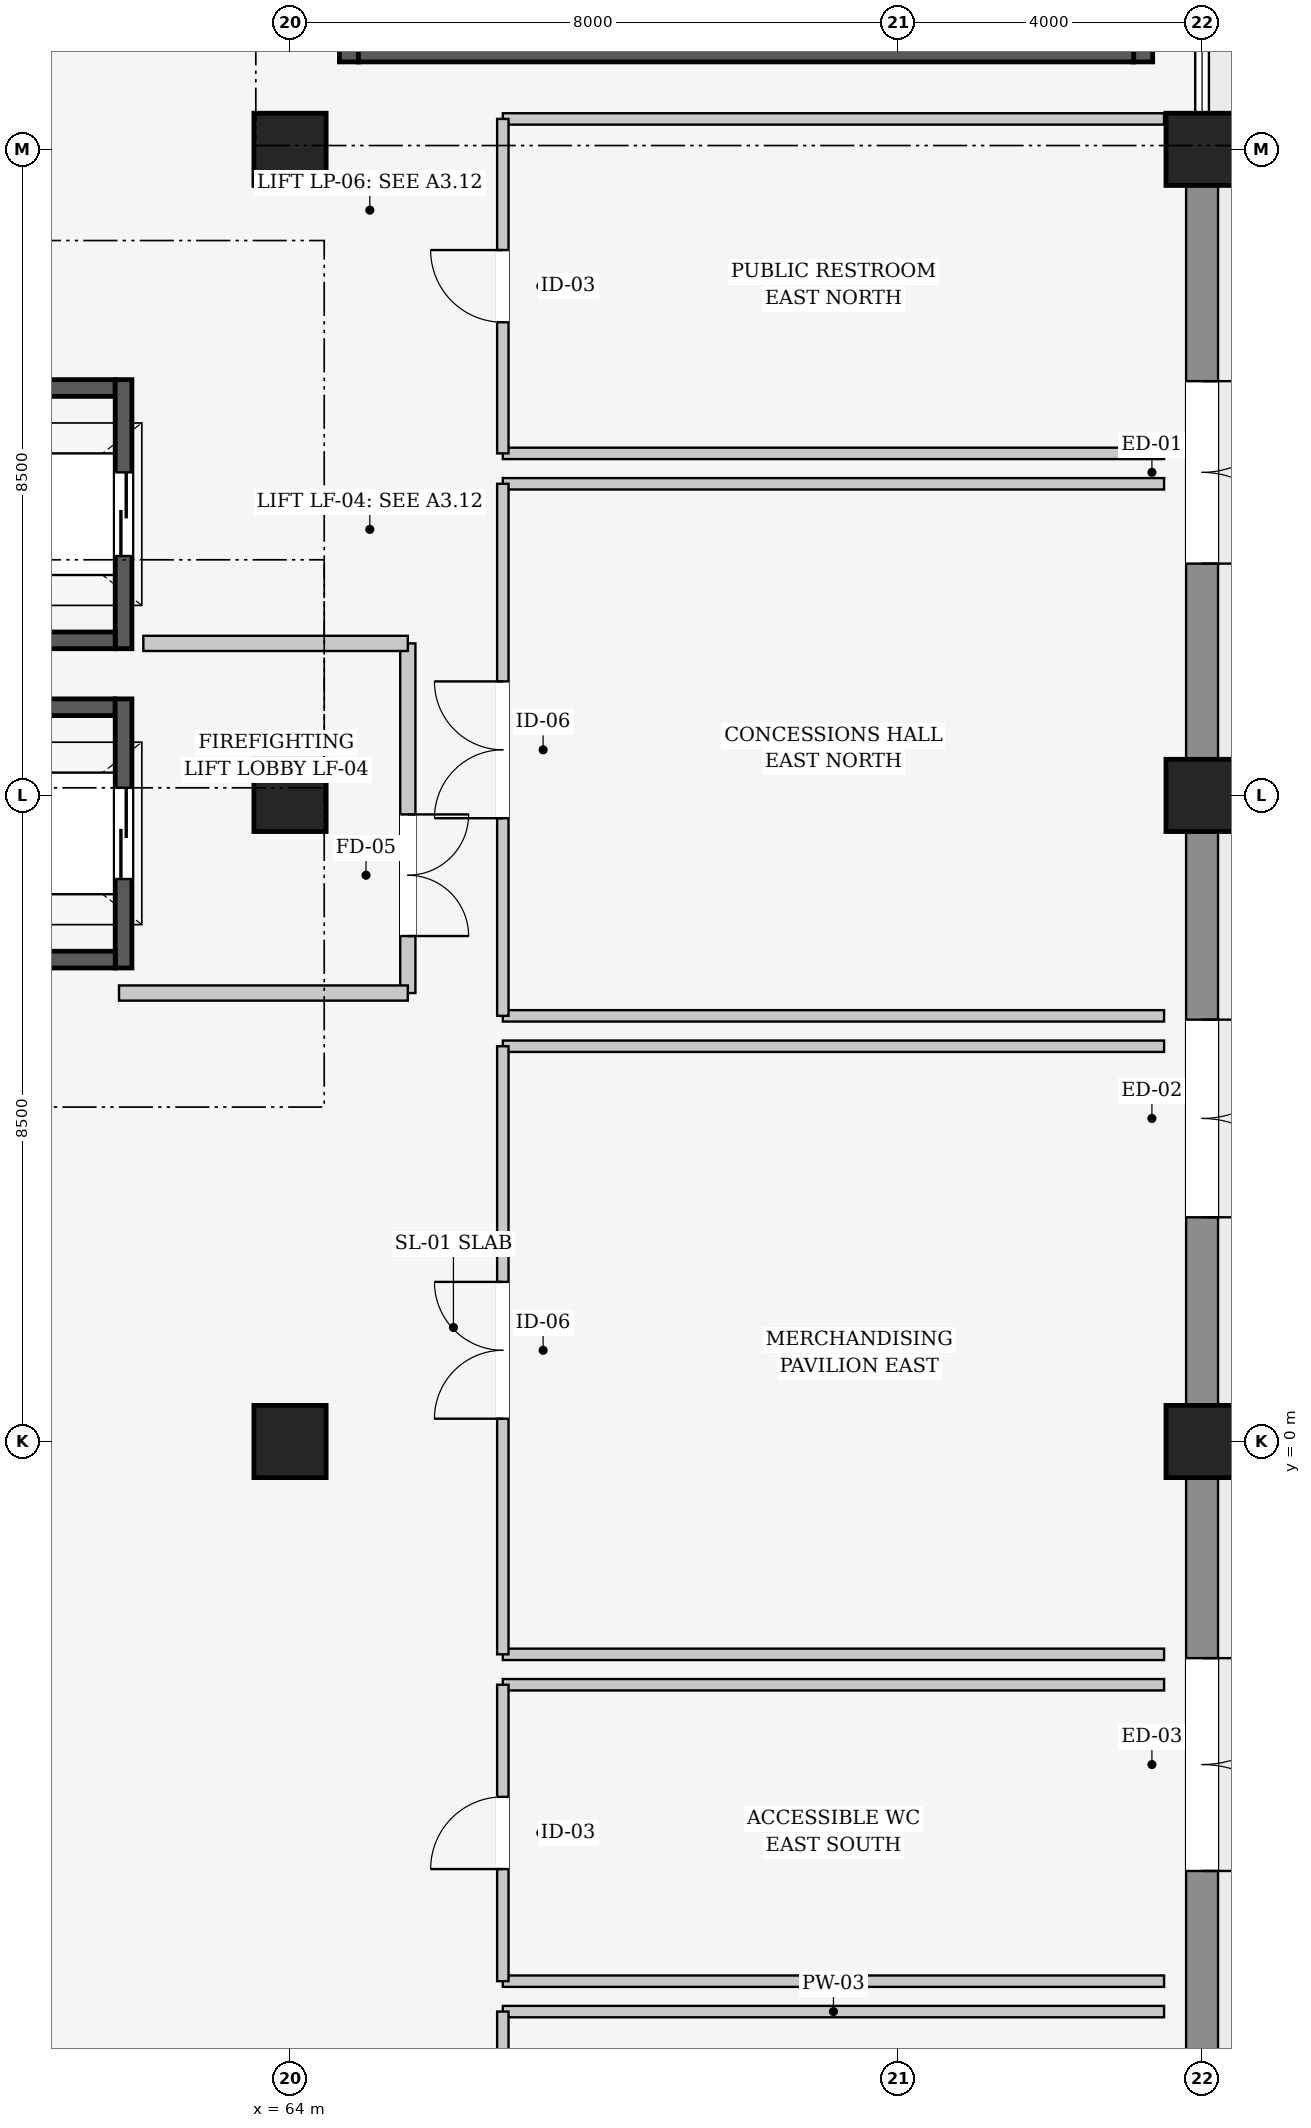
"""IFC4 building model, lengths in metres.
Left out: names, types, materials, properties, quantities, classifications, styles, units other than length and angle.
Written with IfcOpenShell. Run it as: python <this file> out.ifc"""

import sys

from ifc_helpers import new_model, si_unit, direction, frame, frame_2d, origin, origin_2d, place, context, subcontext, project, spatial, rectangle, extrude, element, fill, save


model = new_model("IFC4")
c1 = context("Model", 3, precision=1e-05, world=origin(), true_north=direction((0.0, 1.0)))
c2 = subcontext(c1, "Body", "Model", "MODEL_VIEW")
j1 = project(units=[si_unit("LENGTHUNIT", "METRE"), si_unit("PLANEANGLEUNIT", "RADIAN")], contexts=[c1])
p1 = place(None, origin())
s1 = spatial("IfcSite", under=j1, at=p1, CompositionType="ELEMENT")
p2 = place(p1, origin())
s2 = spatial("IfcBuilding", under=s1, at=p2, CompositionType="ELEMENT")
p3 = place(p2, origin())
s3 = spatial("IfcBuildingStorey", under=s2, at=p3, CompositionType="ELEMENT", Elevation=0.0)
for number, where, z_axis, x_axis in (
    (1, (64.0, 0.0, 0.0), (0.0, 0.0, 1.0), (1.0, 0.0, 0.0)),
    (2, (64.0, 8.5, 0.0), (0.0, 0.0, 1.0), (1.0, 0.0, 0.0)),
    (3, (64.0, 17.0, 0.0), (0.0, 0.0, 1.0), (1.0, 0.0, 0.0)),
    (4, (76.0, 0.0, 0.0), (0.0, 0.0, 1.0), (1.0, 0.0, 0.0)),
    (5, (76.0, 8.5, 0.0), (0.0, 0.0, 1.0), (1.0, 0.0, 0.0)),
    (6, (76.0, 17.0, 0.0), (0.0, 0.0, 1.0), (1.0, 0.0, 0.0)),
):
    element("IfcColumn", number, at=place(p3, frame(where, z_axis=z_axis, x_axis=x_axis)), inside=s3, PredefinedType="COLUMN", context=c2, shape_type="SweptSolid", body=[
        extrude(rectangle(XDim=0.95, YDim=0.95, at=origin_2d()), origin(), (0.0, 0.0, 1.0), 6.0),
    ])
p4 = place(p3, frame((76.0, -0.457, 0.0), z_axis=(0.0, 0.0, 1.0), x_axis=(0.0, -1.0, 0.0)))
e7 = element("IfcWall", 7, at=p4, inside=s3, PredefinedType="SOLIDWALL", context=c2, shape_type="SweptSolid", body=[
    extrude(rectangle(XDim=7.586, YDim=0.42, at=frame_2d((3.793, 0.0))), origin(), (0.0, 0.0, 1.0), 4.74),
])
p5 = place(p4, frame((2.393, 0.0, 0.0)))
e8 = element("IfcOpeningElement", 8, at=p5, cuts=e7, PredefinedType="OPENING", context=c2, shape_type="SweptSolid", body=[
    extrude(rectangle(XDim=2.8, YDim=3.2, at=frame_2d((1.4, 1.6))), frame((0.0, 0.22, 0.0), z_axis=(0.0, -1.0, 0.0), x_axis=(1.0, 0.0, 0.0)), (0.0, 0.0, 1.0), 0.44),
])
p6 = place(p3, frame((76.0, 8.043, 0.0), z_axis=(0.0, 0.0, 1.0), x_axis=(0.0, -1.0, 0.0)))
e9 = element("IfcWall", 9, at=p6, inside=s3, PredefinedType="SOLIDWALL", context=c2, shape_type="SweptSolid", body=[
    extrude(rectangle(XDim=7.586, YDim=0.42, at=frame_2d((3.793, 0.0))), origin(), (0.0, 0.0, 1.0), 4.74),
])
p7 = place(p6, frame((2.493, 0.0, 0.0)))
e10 = element("IfcOpeningElement", 10, at=p7, cuts=e9, PredefinedType="OPENING", context=c2, shape_type="SweptSolid", body=[
    extrude(rectangle(XDim=2.6, YDim=3.0, at=frame_2d((1.3, 1.5))), frame((0.0, 0.22, 0.0), z_axis=(0.0, -1.0, 0.0), x_axis=(1.0, 0.0, 0.0)), (0.0, 0.0, 1.0), 0.44),
])
p8 = place(p3, frame((76.0, 16.543, 0.0), z_axis=(0.0, 0.0, 1.0), x_axis=(0.0, -1.0, 0.0)))
e11 = element("IfcWall", 11, at=p8, inside=s3, PredefinedType="SOLIDWALL", context=c2, shape_type="SweptSolid", body=[
    extrude(rectangle(XDim=7.586, YDim=0.42, at=frame_2d((3.793, 0.0))), origin(), (0.0, 0.0, 1.0), 4.74),
])
p9 = place(p8, frame((2.593, 0.0, 0.0)))
e12 = element("IfcOpeningElement", 12, at=p9, cuts=e11, PredefinedType="OPENING", context=c2, shape_type="SweptSolid", body=[
    extrude(rectangle(XDim=2.4, YDim=3.0, at=frame_2d((1.2, 1.5))), frame((0.0, 0.22, 0.0), z_axis=(0.0, -1.0, 0.0), x_axis=(1.0, 0.0, 0.0)), (0.0, 0.0, 1.0), 0.44),
])
p10 = place(p3, frame((64.775, 18.15, 0.0), z_axis=(0.0, 0.0, 1.0), x_axis=(0.0, 1.0, 0.0)))
e13 = element("IfcWall", 13, at=p10, inside=s3, PredefinedType="SHEAR", context=c2, shape_type="SweptSolid", body=[
    extrude(rectangle(XDim=5.7, YDim=0.25, at=frame_2d((2.85, 0.0))), origin(), (0.0, 0.0, 1.0), 6.0),
])
p11 = place(p10, frame((2.025, 0.0, 0.0)))
e14 = element("IfcOpeningElement", 14, at=p11, cuts=e13, PredefinedType="OPENING", context=c2, shape_type="SweptSolid", body=[
    extrude(rectangle(XDim=1.65, YDim=2.2, at=frame_2d((0.825, 1.1))), frame((0.0, 0.135, 0.0), z_axis=(0.0, -1.0, 0.0), x_axis=(1.0, 0.0, 0.0)), (0.0, 0.0, 1.0), 0.27),
])
p12 = place(p3, frame((75.225, 23.85, 0.0), z_axis=(0.0, 0.0, 1.0), x_axis=(0.0, -1.0, 0.0)))
e15 = element("IfcWall", 15, at=p12, inside=s3, PredefinedType="SHEAR", context=c2, shape_type="SweptSolid", body=[
    extrude(rectangle(XDim=5.7, YDim=0.25, at=frame_2d((2.85, 0.0))), origin(), (0.0, 0.0, 1.0), 6.0),
])
p13 = place(p3, frame((75.1, 18.275, 0.0), z_axis=(0.0, 0.0, 1.0), x_axis=(-1.0, 0.0, 0.0)))
e16 = element("IfcWall", 16, at=p13, inside=s3, PredefinedType="SHEAR", context=c2, shape_type="SweptSolid", body=[
    extrude(rectangle(XDim=10.2, YDim=0.25, at=frame_2d((5.1, 0.0))), origin(), (0.0, 0.0, 1.0), 6.0),
])
p14 = place(p3, frame((59.3, 9.66, 0.0), z_axis=(0.0, 0.0, 1.0), x_axis=(1.0, 0.0, 0.0)))
e17 = element("IfcWall", 17, at=p14, inside=s3, PredefinedType="SHEAR", context=c2, shape_type="SweptSolid", body=[
    extrude(rectangle(XDim=2.4, YDim=0.22, at=frame_2d((1.2, 0.0))), origin(), (0.0, 0.0, 1.0), 6.0),
])
p15 = place(p3, frame((61.81, 9.77, 0.0), z_axis=(0.0, 0.0, 1.0), x_axis=(0.0, -1.0, 0.0)))
e18 = element("IfcWall", 18, at=p15, inside=s3, PredefinedType="SHEAR", context=c2, shape_type="SweptSolid", body=[
    extrude(rectangle(XDim=3.54, YDim=0.22, at=frame_2d((1.77, 0.0))), origin(), (0.0, 0.0, 1.0), 6.0),
])
p16 = place(p15, frame((1.17, 0.0, 0.0)))
e19 = element("IfcOpeningElement", 19, at=p16, cuts=e18, PredefinedType="OPENING", context=c2, shape_type="SweptSolid", body=[
    extrude(rectangle(XDim=1.2, YDim=2.2, at=frame_2d((0.6, 1.1))), frame((0.0, 0.12, 0.0), z_axis=(0.0, -1.0, 0.0), x_axis=(1.0, 0.0, 0.0)), (0.0, 0.0, 1.0), 0.24),
])
for number, where, z_axis, x_axis in (
    (20, (61.7, 6.34, 0.0), (0.0, 0.0, 1.0), (-1.0, 0.0, 0.0)),
    (21, (59.3, 13.86, 0.0), (0.0, 0.0, 1.0), (1.0, 0.0, 0.0)),
):
    element("IfcWall", number, at=place(p3, frame(where, z_axis=z_axis, x_axis=x_axis)), inside=s3, PredefinedType="SHEAR", context=c2, shape_type="SweptSolid", body=[
        extrude(rectangle(XDim=2.4, YDim=0.22, at=frame_2d((1.2, 0.0))), origin(), (0.0, 0.0, 1.0), 6.0),
    ])
p17 = place(p3, frame((61.81, 13.97, 0.0), z_axis=(0.0, 0.0, 1.0), x_axis=(0.0, -1.0, 0.0)))
e22 = element("IfcWall", 22, at=p17, inside=s3, PredefinedType="SHEAR", context=c2, shape_type="SweptSolid", body=[
    extrude(rectangle(XDim=3.54, YDim=0.22, at=frame_2d((1.77, 0.0))), origin(), (0.0, 0.0, 1.0), 6.0),
])
p18 = place(p17, frame((1.22, 0.0, 0.0)))
e23 = element("IfcOpeningElement", 23, at=p18, cuts=e22, PredefinedType="OPENING", context=c2, shape_type="SweptSolid", body=[
    extrude(rectangle(XDim=1.1, YDim=2.2, at=frame_2d((0.55, 1.1))), frame((0.0, 0.12, 0.0), z_axis=(0.0, -1.0, 0.0), x_axis=(1.0, 0.0, 0.0)), (0.0, 0.0, 1.0), 0.24),
])
p19 = place(p3, frame((61.7, 10.54, 0.0), z_axis=(0.0, 0.0, 1.0), x_axis=(-1.0, 0.0, 0.0)))
e24 = element("IfcWall", 24, at=p19, inside=s3, PredefinedType="SHEAR", context=c2, shape_type="SweptSolid", body=[
    extrude(rectangle(XDim=2.4, YDim=0.22, at=frame_2d((1.2, 0.0))), origin(), (0.0, 0.0, 1.0), 6.0),
])
p20 = place(p3, frame((65.55, 10.5, 0.0), z_axis=(0.0, 0.0, 1.0), x_axis=(0.0, -1.0, 0.0)))
e25 = element("IfcWall", 25, at=p20, inside=s3, PredefinedType="PARTITIONING", context=c2, shape_type="SweptSolid", body=[
    extrude(rectangle(XDim=4.6, YDim=0.2, at=frame_2d((2.3, 0.0))), origin(), (0.0, 0.0, 1.0), 4.725),
])
p21 = place(p20, frame((2.25, 0.0, 0.0)))
e26 = element("IfcOpeningElement", 26, at=p21, cuts=e25, PredefinedType="OPENING", context=c2, shape_type="SweptSolid", body=[
    extrude(rectangle(XDim=1.6, YDim=2.2, at=frame_2d((0.8, 1.1))), frame((0.0, 0.11, 0.0), z_axis=(0.0, -1.0, 0.0), x_axis=(1.0, 0.0, 0.0)), (0.0, 0.0, 1.0), 0.22),
])
p22 = place(p3, frame((62.07, 10.5, 0.0), z_axis=(0.0, 0.0, 1.0), x_axis=(1.0, 0.0, 0.0)))
e27 = element("IfcWall", 27, at=p22, inside=s3, PredefinedType="PARTITIONING", context=c2, shape_type="SweptSolid", body=[
    extrude(rectangle(XDim=3.48, YDim=0.2, at=frame_2d((1.74, 0.0))), origin(), (0.0, 0.0, 1.0), 5.025),
])
p23 = place(p3, frame((65.55, 5.9, 0.0), z_axis=(0.0, 0.0, 1.0), x_axis=(-1.0, 0.0, 0.0)))
e28 = element("IfcWall", 28, at=p23, inside=s3, PredefinedType="PARTITIONING", context=c2, shape_type="SweptSolid", body=[
    extrude(rectangle(XDim=3.8, YDim=0.2, at=frame_2d((1.9, 0.0))), origin(), (0.0, 0.0, 1.0), 5.025),
])
p24 = place(p3, frame((66.8, -7.5, 0.0), z_axis=(0.0, 0.0, 1.0), x_axis=(1.0, 0.0, 0.0)))
e29 = element("IfcWall", 29, at=p24, inside=s3, PredefinedType="PARTITIONING", context=c2, shape_type="SweptSolid", body=[
    extrude(rectangle(XDim=8.7, YDim=0.15, at=frame_2d((4.35, 0.0))), origin(), (0.0, 0.0, 1.0), 5.64),
])
p25 = place(p3, frame((66.8, -14.6, 0.0), z_axis=(0.0, 0.0, 1.0), x_axis=(0.0, 1.0, 0.0)))
e30 = element("IfcWall", 30, at=p25, inside=s3, PredefinedType="PARTITIONING", context=c2, shape_type="SweptSolid", body=[
    extrude(rectangle(XDim=7.1, YDim=0.15, at=frame_2d((3.55, 0.0))), origin(), (0.0, 0.0, 1.0), 4.725),
])
p26 = place(p25, frame((3.075, 0.0, 0.0)))
e31 = element("IfcOpeningElement", 31, at=p26, cuts=e30, PredefinedType="OPENING", context=c2, shape_type="SweptSolid", body=[
    extrude(rectangle(XDim=0.95, YDim=2.15, at=frame_2d((0.475, 1.075))), frame((0.0, 0.085, 0.0), z_axis=(0.0, -1.0, 0.0), x_axis=(1.0, 0.0, 0.0)), (0.0, 0.0, 1.0), 0.17),
])
for number, where, z_axis, x_axis in (
    (32, (66.8, -3.2, 0.0), (0.0, 0.0, 1.0), (1.0, 0.0, 0.0)),
    (33, (75.5, -7.1, 0.0), (0.0, 0.0, 1.0), (-1.0, 0.0, 0.0)),
):
    element("IfcWall", number, at=place(p3, frame(where, z_axis=z_axis, x_axis=x_axis)), inside=s3, PredefinedType="PARTITIONING", context=c2, shape_type="SweptSolid", body=[
        extrude(rectangle(XDim=8.7, YDim=0.15, at=frame_2d((4.35, 0.0))), origin(), (0.0, 0.0, 1.0), 5.64),
    ])
p27 = place(p3, frame((66.8, -7.1, 0.0), z_axis=(0.0, 0.0, 1.0), x_axis=(0.0, 1.0, 0.0)))
e34 = element("IfcWall", 34, at=p27, inside=s3, PredefinedType="PARTITIONING", context=c2, shape_type="SweptSolid", body=[
    extrude(rectangle(XDim=3.9, YDim=0.15, at=frame_2d((1.95, 0.0))), origin(), (0.0, 0.0, 1.0), 5.32),
])
p28 = place(p27, frame((1.475, 0.0, 0.0)))
e35 = element("IfcOpeningElement", 35, at=p28, cuts=e34, PredefinedType="OPENING", context=c2, shape_type="SweptSolid", body=[
    extrude(rectangle(XDim=0.95, YDim=2.15, at=frame_2d((0.475, 1.075))), frame((0.0, 0.085, 0.0), z_axis=(0.0, -1.0, 0.0), x_axis=(1.0, 0.0, 0.0)), (0.0, 0.0, 1.0), 0.17),
])
for number, where, z_axis, x_axis in (
    (36, (66.8, 5.2, 0.0), (0.0, 0.0, 1.0), (1.0, 0.0, 0.0)),
    (37, (75.5, -2.8, 0.0), (0.0, 0.0, 1.0), (-1.0, 0.0, 0.0)),
):
    element("IfcWall", number, at=place(p3, frame(where, z_axis=z_axis, x_axis=x_axis)), inside=s3, PredefinedType="PARTITIONING", context=c2, shape_type="SweptSolid", body=[
        extrude(rectangle(XDim=8.7, YDim=0.15, at=frame_2d((4.35, 0.0))), origin(), (0.0, 0.0, 1.0), 5.64),
    ])
p29 = place(p3, frame((66.8, -2.8, 0.0), z_axis=(0.0, 0.0, 1.0), x_axis=(0.0, 1.0, 0.0)))
e38 = element("IfcWall", 38, at=p29, inside=s3, PredefinedType="PARTITIONING", context=c2, shape_type="SweptSolid", body=[
    extrude(rectangle(XDim=8.0, YDim=0.15, at=frame_2d((4.0, 0.0))), origin(), (0.0, 0.0, 1.0), 4.725),
])
p30 = place(p29, frame((3.1, 0.0, 0.0)))
e39 = element("IfcOpeningElement", 39, at=p30, cuts=e38, PredefinedType="OPENING", context=c2, shape_type="SweptSolid", body=[
    extrude(rectangle(XDim=1.8, YDim=2.2, at=frame_2d((0.9, 1.1))), frame((0.0, 0.085, 0.0), z_axis=(0.0, -1.0, 0.0), x_axis=(1.0, 0.0, 0.0)), (0.0, 0.0, 1.0), 0.17),
])
p31 = place(p3, frame((66.8, 12.6, 0.0), z_axis=(0.0, 0.0, 1.0), x_axis=(1.0, 0.0, 0.0)))
e40 = element("IfcWall", 40, at=p31, inside=s3, PredefinedType="PARTITIONING", context=c2, shape_type="SweptSolid", body=[
    extrude(rectangle(XDim=8.7, YDim=0.15, at=frame_2d((4.35, 0.0))), origin(), (0.0, 0.0, 1.0), 5.32),
])
p32 = place(p3, frame((75.5, 5.6, 0.0), z_axis=(0.0, 0.0, 1.0), x_axis=(-1.0, 0.0, 0.0)))
e41 = element("IfcWall", 41, at=p32, inside=s3, PredefinedType="PARTITIONING", context=c2, shape_type="SweptSolid", body=[
    extrude(rectangle(XDim=8.7, YDim=0.15, at=frame_2d((4.35, 0.0))), origin(), (0.0, 0.0, 1.0), 5.64),
])
p33 = place(p3, frame((66.8, 5.6, 0.0), z_axis=(0.0, 0.0, 1.0), x_axis=(0.0, 1.0, 0.0)))
e42 = element("IfcWall", 42, at=p33, inside=s3, PredefinedType="PARTITIONING", context=c2, shape_type="SweptSolid", body=[
    extrude(rectangle(XDim=7.0, YDim=0.15, at=frame_2d((3.5, 0.0))), origin(), (0.0, 0.0, 1.0), 4.725),
])
p34 = place(p33, frame((2.6, 0.0, 0.0)))
e43 = element("IfcOpeningElement", 43, at=p34, cuts=e42, PredefinedType="OPENING", context=c2, shape_type="SweptSolid", body=[
    extrude(rectangle(XDim=1.8, YDim=2.2, at=frame_2d((0.9, 1.1))), frame((0.0, 0.085, 0.0), z_axis=(0.0, -1.0, 0.0), x_axis=(1.0, 0.0, 0.0)), (0.0, 0.0, 1.0), 0.17),
])
p35 = place(p3, frame((66.8, 17.4, 0.0), z_axis=(0.0, 0.0, 1.0), x_axis=(1.0, 0.0, 0.0)))
e44 = element("IfcWall", 44, at=p35, inside=s3, PredefinedType="PARTITIONING", context=c2, shape_type="SweptSolid", body=[
    extrude(rectangle(XDim=8.7, YDim=0.15, at=frame_2d((4.35, 0.0))), origin(), (0.0, 0.0, 1.0), 4.725),
])
p36 = place(p3, frame((75.5, 13.0, 0.0), z_axis=(0.0, 0.0, 1.0), x_axis=(-1.0, 0.0, 0.0)))
e45 = element("IfcWall", 45, at=p36, inside=s3, PredefinedType="PARTITIONING", context=c2, shape_type="SweptSolid", body=[
    extrude(rectangle(XDim=8.7, YDim=0.15, at=frame_2d((4.35, 0.0))), origin(), (0.0, 0.0, 1.0), 5.32),
])
p37 = place(p3, frame((66.8, 13.0, 0.0), z_axis=(0.0, 0.0, 1.0), x_axis=(0.0, 1.0, 0.0)))
e46 = element("IfcWall", 46, at=p37, inside=s3, PredefinedType="PARTITIONING", context=c2, shape_type="SweptSolid", body=[
    extrude(rectangle(XDim=4.4, YDim=0.15, at=frame_2d((2.2, 0.0))), origin(), (0.0, 0.0, 1.0), 4.725),
])
p38 = place(p37, frame((1.725, 0.0, 0.0)))
e47 = element("IfcOpeningElement", 47, at=p38, cuts=e46, PredefinedType="OPENING", context=c2, shape_type="SweptSolid", body=[
    extrude(rectangle(XDim=0.95, YDim=2.15, at=frame_2d((0.475, 1.075))), frame((0.0, 0.085, 0.0), z_axis=(0.0, -1.0, 0.0), x_axis=(1.0, 0.0, 0.0)), (0.0, 0.0, 1.0), 0.17),
])
p39 = place(p5, origin())
e48 = element("IfcDoor", 48, at=p39, inside=s3, OperationType="DOUBLE_DOOR_SINGLE_SWING", PredefinedType="DOOR", context=c2, shape_type="SweptSolid", body=[
    extrude(rectangle(XDim=2.8, YDim=3.2, at=frame_2d((1.4, 1.6))), frame((0.0, 0.025, 0.0), z_axis=(0.0, -1.0, 0.0), x_axis=(1.0, 0.0, 0.0)), (0.0, 0.0, 1.0), 0.05),
])
fill(e8, e48)
p40 = place(p7, origin())
e49 = element("IfcDoor", 49, at=p40, inside=s3, OperationType="DOUBLE_DOOR_SINGLE_SWING", PredefinedType="DOOR", context=c2, shape_type="SweptSolid", body=[
    extrude(rectangle(XDim=2.6, YDim=3.0, at=frame_2d((1.3, 1.5))), frame((0.0, 0.025, 0.0), z_axis=(0.0, -1.0, 0.0), x_axis=(1.0, 0.0, 0.0)), (0.0, 0.0, 1.0), 0.05),
])
fill(e10, e49)
p41 = place(p9, origin())
e50 = element("IfcDoor", 50, at=p41, inside=s3, OperationType="DOUBLE_DOOR_SINGLE_SWING", PredefinedType="DOOR", context=c2, shape_type="SweptSolid", body=[
    extrude(rectangle(XDim=2.4, YDim=3.0, at=frame_2d((1.2, 1.5))), frame((0.0, 0.025, 0.0), z_axis=(0.0, -1.0, 0.0), x_axis=(1.0, 0.0, 0.0)), (0.0, 0.0, 1.0), 0.05),
])
fill(e12, e50)
p42 = place(p16, origin())
e51 = element("IfcDoor", 51, at=p42, inside=s3, OperationType="SLIDING_TO_LEFT", PredefinedType="DOOR", context=c2, shape_type="SweptSolid", body=[
    extrude(rectangle(XDim=1.2, YDim=2.2, at=frame_2d((0.6, 1.1))), frame((0.0, 0.025, 0.0), z_axis=(0.0, -1.0, 0.0), x_axis=(1.0, 0.0, 0.0)), (0.0, 0.0, 1.0), 0.05),
])
fill(e19, e51)
p43 = place(p18, origin())
e52 = element("IfcDoor", 52, at=p43, inside=s3, OperationType="SLIDING_TO_LEFT", PredefinedType="DOOR", context=c2, shape_type="SweptSolid", body=[
    extrude(rectangle(XDim=1.1, YDim=2.2, at=frame_2d((0.55, 1.1))), frame((0.0, 0.025, 0.0), z_axis=(0.0, -1.0, 0.0), x_axis=(1.0, 0.0, 0.0)), (0.0, 0.0, 1.0), 0.05),
])
fill(e23, e52)
p44 = place(p21, origin())
e53 = element("IfcDoor", 53, at=p44, inside=s3, OperationType="DOUBLE_DOOR_SINGLE_SWING", PredefinedType="DOOR", context=c2, shape_type="SweptSolid", body=[
    extrude(rectangle(XDim=1.6, YDim=2.2, at=frame_2d((0.8, 1.1))), frame((0.0, 0.025, 0.0), z_axis=(0.0, -1.0, 0.0), x_axis=(1.0, 0.0, 0.0)), (0.0, 0.0, 1.0), 0.05),
])
fill(e26, e53)
p45 = place(p28, origin())
e54 = element("IfcDoor", 54, at=p45, inside=s3, OperationType="SINGLE_SWING_LEFT", PredefinedType="DOOR", context=c2, shape_type="SweptSolid", body=[
    extrude(rectangle(XDim=0.95, YDim=2.15, at=frame_2d((0.475, 1.075))), frame((0.0, 0.025, 0.0), z_axis=(0.0, -1.0, 0.0), x_axis=(1.0, 0.0, 0.0)), (0.0, 0.0, 1.0), 0.05),
])
fill(e35, e54)
p46 = place(p30, origin())
e55 = element("IfcDoor", 55, at=p46, inside=s3, OperationType="DOUBLE_DOOR_SINGLE_SWING", PredefinedType="DOOR", context=c2, shape_type="SweptSolid", body=[
    extrude(rectangle(XDim=1.8, YDim=2.2, at=frame_2d((0.9, 1.1))), frame((0.0, 0.025, 0.0), z_axis=(0.0, -1.0, 0.0), x_axis=(1.0, 0.0, 0.0)), (0.0, 0.0, 1.0), 0.05),
])
fill(e39, e55)
p47 = place(p34, origin())
e56 = element("IfcDoor", 56, at=p47, inside=s3, OperationType="DOUBLE_DOOR_SINGLE_SWING", PredefinedType="DOOR", context=c2, shape_type="SweptSolid", body=[
    extrude(rectangle(XDim=1.8, YDim=2.2, at=frame_2d((0.9, 1.1))), frame((0.0, 0.025, 0.0), z_axis=(0.0, -1.0, 0.0), x_axis=(1.0, 0.0, 0.0)), (0.0, 0.0, 1.0), 0.05),
])
fill(e43, e56)
p48 = place(p38, origin())
e57 = element("IfcDoor", 57, at=p48, inside=s3, OperationType="SINGLE_SWING_RIGHT", PredefinedType="DOOR", context=c2, shape_type="SweptSolid", body=[
    extrude(rectangle(XDim=0.95, YDim=2.15, at=frame_2d((0.475, 1.075))), frame((0.0, 0.025, 0.0), z_axis=(0.0, -1.0, 0.0), x_axis=(1.0, 0.0, 0.0)), (0.0, 0.0, 1.0), 0.05),
])
fill(e47, e57)
save(model, sys.argv[1])
